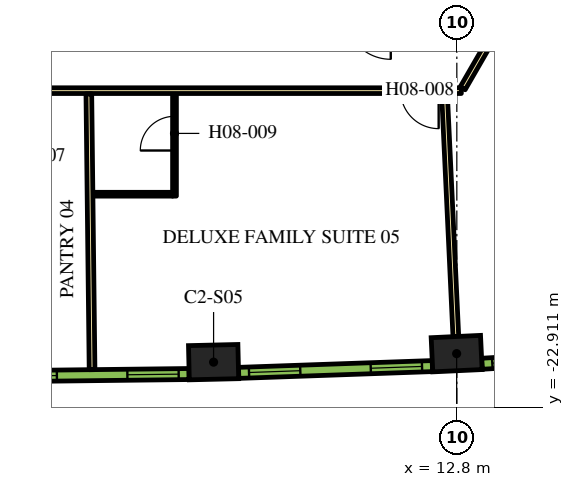
"""IFC4 building model, lengths in metres.
Left out: names, types, materials, properties, quantities, classifications, styles, units other than length and angle.
Written with IfcOpenShell. Run it as: python <this file> out.ifc"""

import sys

from ifc_helpers import new_model, si_unit, direction, frame, frame_2d, origin, origin_2d, place, context, subcontext, project, spatial, rectangle, extrude, element, fill, save


model = new_model("IFC4")
c1 = context("Model", 3, precision=1e-05, world=origin(), true_north=direction((0.0, 1.0)))
c2 = subcontext(c1, "Body", "Model", "MODEL_VIEW")
j1 = project(units=[si_unit("LENGTHUNIT", "METRE"), si_unit("PLANEANGLEUNIT", "RADIAN")], contexts=[c1])
p1 = place(None, origin())
s1 = spatial("IfcSite", under=j1, at=p1, CompositionType="ELEMENT")
p2 = place(p1, origin())
s2 = spatial("IfcBuilding", under=s1, at=p2, CompositionType="ELEMENT")
p3 = place(p2, frame((0.0, 0.0, 111.0)))
s3 = spatial("IfcBuildingStorey", under=s2, at=p3, CompositionType="ELEMENT", Elevation=111.0)
for number, where, z_axis, x_axis in (
    (1, (6.399, -21.719, 0.0), (0.0, 0.0, 1.0), (1.0, 0.023, 0.0)),
    (2, (12.795, -21.494, 0.0), (0.0, 0.0, 1.0), (0.999, 0.047, 0.0)),
):
    element("IfcColumn", number, at=place(p3, frame(where, z_axis=z_axis, x_axis=x_axis)), inside=s3, PredefinedType="COLUMN", context=c2, shape_type="SweptSolid", body=[
        extrude(rectangle(XDim=1.3, YDim=0.9, at=origin_2d()), origin(), (0.0, 0.0, 1.0), 3.9),
    ])
p4 = place(p3, frame((12.918, -14.575, 0.0), z_axis=(0.0, 0.0, 1.0), x_axis=(-1.0, 0.0, 0.0)))
e3 = element("IfcWall", 3, at=p4, inside=s3, PredefinedType="PARTITIONING", context=c2, shape_type="SweptSolid", body=[
    extrude(rectangle(XDim=25.766, YDim=0.15, at=frame_2d((12.883, 0.0))), origin(), (0.0, 0.0, 1.0), 2.75),
])
p5 = place(p4, frame((24.586, 0.0, 0.0)))
e4 = element("IfcOpeningElement", 4, at=p5, cuts=e3, PredefinedType="OPENING", context=c2, shape_type="SweptSolid", body=[
    extrude(rectangle(XDim=1.0, YDim=2.1, at=frame_2d((0.5, 1.05))), frame((0.0, 0.085, 0.0), z_axis=(0.0, -1.0, 0.0), x_axis=(1.0, 0.0, 0.0)), (0.0, 0.0, 1.0), 0.17),
])
p6 = place(p4, frame((13.144, 0.0, 0.0)))
e5 = element("IfcOpeningElement", 5, at=p6, cuts=e3, PredefinedType="OPENING", context=c2, shape_type="SweptSolid", body=[
    extrude(rectangle(XDim=1.0, YDim=2.1, at=frame_2d((0.5, 1.05))), frame((0.0, 0.085, 0.0), z_axis=(0.0, -1.0, 0.0), x_axis=(1.0, 0.0, 0.0)), (0.0, 0.0, 1.0), 0.17),
])
p7 = place(p4, frame((10.874, 0.0, 0.0)))
e6 = element("IfcOpeningElement", 6, at=p7, cuts=e3, PredefinedType="OPENING", context=c2, shape_type="SweptSolid", body=[
    extrude(rectangle(XDim=0.9, YDim=2.1, at=frame_2d((0.45, 1.05))), frame((0.0, 0.085, 0.0), z_axis=(0.0, -1.0, 0.0), x_axis=(1.0, 0.0, 0.0)), (0.0, 0.0, 1.0), 0.17),
])
p8 = place(p4, frame((0.596, 0.0, 0.0)))
e7 = element("IfcOpeningElement", 7, at=p8, cuts=e3, PredefinedType="OPENING", context=c2, shape_type="SweptSolid", body=[
    extrude(rectangle(XDim=1.0, YDim=2.1, at=frame_2d((0.5, 1.05))), frame((0.0, 0.085, 0.0), z_axis=(0.0, -1.0, 0.0), x_axis=(1.0, 0.0, 0.0)), (0.0, 0.0, 1.0), 0.17),
])
p9 = place(p3, frame((15.587, -9.952, 0.0), z_axis=(0.0, 0.0, 1.0), x_axis=(-0.500016618951, -0.866015808616, 0.0)))
e8 = element("IfcWall", 8, at=p9, inside=s3, PredefinedType="PARTITIONING", context=c2, shape_type="SweptSolid", body=[
    extrude(rectangle(XDim=5.268, YDim=0.15, at=frame_2d((2.634, 0.0))), origin(), (0.0, 0.0, 1.0), 2.75),
])
p10 = place(p3, frame((3.202, -21.916, 0.0), z_axis=(0.0, 0.0, 1.0), x_axis=(-0.011707696285, 0.999931462575, 0.0)))
e9 = element("IfcWall", 9, at=p10, inside=s3, PredefinedType="PARTITIONING", context=c2, shape_type="SweptSolid", body=[
    extrude(rectangle(XDim=7.257, YDim=0.15, at=frame_2d((3.628, 0.0))), origin(), (0.0, 0.0, 1.0), 2.75),
])
p11 = place(p3, frame((12.774, -21.045, 0.0), z_axis=(0.0, 0.0, 1.0), x_axis=(-0.046750341626, 0.998906605023, 0.0)))
e10 = element("IfcWall", 10, at=p11, inside=s3, PredefinedType="PARTITIONING", context=c2, shape_type="SweptSolid", body=[
    extrude(rectangle(XDim=6.392, YDim=0.15, at=frame_2d((3.196, 0.0))), origin(), (0.0, 0.0, 1.0), 2.75),
])
p12 = place(p3, frame((5.371, -17.35, 0.0), z_axis=(0.0, 0.0, 1.0), x_axis=(0.0, 1.0, 0.0)))
e11 = element("IfcWall", 11, at=p12, inside=s3, PredefinedType="PARTITIONING", context=c2, shape_type="SweptSolid", body=[
    extrude(rectangle(XDim=2.7, YDim=0.1, at=frame_2d((1.35, 0.0))), origin(), (0.0, 0.0, 1.0), 2.75),
])
p13 = place(p12, frame((1.2, 0.0, 0.0)))
e12 = element("IfcOpeningElement", 12, at=p13, cuts=e11, PredefinedType="OPENING", context=c2, shape_type="SweptSolid", body=[
    extrude(rectangle(XDim=0.9, YDim=2.1, at=frame_2d((0.45, 1.05))), frame((0.0, 0.06, 0.0), z_axis=(0.0, -1.0, 0.0), x_axis=(1.0, 0.0, 0.0)), (0.0, 0.0, 1.0), 0.12),
])
p14 = place(p3, frame((5.321, -17.3, 0.0), z_axis=(0.0, 0.0, 1.0), x_axis=(-1.0, 0.0, 0.0)))
e13 = element("IfcWall", 13, at=p14, inside=s3, PredefinedType="PARTITIONING", context=c2, shape_type="SweptSolid", body=[
    extrude(rectangle(XDim=2.09, YDim=0.1, at=frame_2d((1.045, 0.0))), origin(), (0.0, 0.0, 1.0), 2.75),
])
p15 = place(p3, frame((0.653, -22.091, 0.0), z_axis=(0.0, 0.0, 1.0), x_axis=(0.999931786565, 0.011679992145, 0.0)))
e14 = element("IfcWall", 14, at=p15, inside=s3, PredefinedType="SOLIDWALL", context=c2, shape_type="SweptSolid", body=[
    extrude(rectangle(XDim=5.1, YDim=0.29, at=frame_2d((2.55, 0.0))), origin(), (0.0, 0.0, 1.0), 3.65),
])
p16 = place(p15, frame((0.273, 0.0, 0.9)))
e15 = element("IfcOpeningElement", 15, at=p16, cuts=e14, PredefinedType="OPENING", context=c2, shape_type="SweptSolid", body=[
    extrude(rectangle(XDim=1.35, YDim=2.15, at=frame_2d((0.675, 1.075))), frame((0.0, 0.155, 0.0), z_axis=(0.0, -1.0, 0.0), x_axis=(1.0, 0.0, 0.0)), (0.0, 0.0, 1.0), 0.31),
])
p17 = place(p15, frame((3.478, 0.0, 0.9)))
e16 = element("IfcOpeningElement", 16, at=p17, cuts=e14, PredefinedType="OPENING", context=c2, shape_type="SweptSolid", body=[
    extrude(rectangle(XDim=1.35, YDim=2.15, at=frame_2d((0.675, 1.075))), frame((0.0, 0.155, 0.0), z_axis=(0.0, -1.0, 0.0), x_axis=(1.0, 0.0, 0.0)), (0.0, 0.0, 1.0), 0.31),
])
p18 = place(p3, frame((7.059, -22.001, 0.0), z_axis=(0.0, 0.0, 1.0), x_axis=(0.999385993957, 0.035037623812, 0.0)))
e17 = element("IfcWall", 17, at=p18, inside=s3, PredefinedType="SOLIDWALL", context=c2, shape_type="SweptSolid", body=[
    extrude(rectangle(XDim=5.101, YDim=0.29, at=frame_2d((2.55, 0.0))), origin(), (0.0, 0.0, 1.0), 3.65),
])
p19 = place(p18, frame((0.273, 0.0, 0.9)))
e18 = element("IfcOpeningElement", 18, at=p19, cuts=e17, PredefinedType="OPENING", context=c2, shape_type="SweptSolid", body=[
    extrude(rectangle(XDim=1.35, YDim=2.15, at=frame_2d((0.675, 1.075))), frame((0.0, 0.155, 0.0), z_axis=(0.0, -1.0, 0.0), x_axis=(1.0, 0.0, 0.0)), (0.0, 0.0, 1.0), 0.31),
])
p20 = place(p18, frame((3.478, 0.0, 0.9)))
e19 = element("IfcOpeningElement", 19, at=p20, cuts=e17, PredefinedType="OPENING", context=c2, shape_type="SweptSolid", body=[
    extrude(rectangle(XDim=1.35, YDim=2.15, at=frame_2d((0.675, 1.075))), frame((0.0, 0.155, 0.0), z_axis=(0.0, -1.0, 0.0), x_axis=(1.0, 0.0, 0.0)), (0.0, 0.0, 1.0), 0.31),
])
p21 = place(p3, frame((13.462, -21.761, 0.0), z_axis=(0.0, 0.0, 1.0), x_axis=(0.998290511436, 0.058447025388, 0.0)))
e20 = element("IfcWall", 20, at=p21, inside=s3, PredefinedType="SOLIDWALL", context=c2, shape_type="SweptSolid", body=[
    extrude(rectangle(XDim=5.1, YDim=0.29, at=frame_2d((2.55, 0.0))), origin(), (0.0, 0.0, 1.0), 3.65),
])
p22 = place(p21, frame((0.272, 0.0, 0.9)))
e21 = element("IfcOpeningElement", 21, at=p22, cuts=e20, PredefinedType="OPENING", context=c2, shape_type="SweptSolid", body=[
    extrude(rectangle(XDim=1.35, YDim=2.15, at=frame_2d((0.675, 1.075))), frame((0.0, 0.155, 0.0), z_axis=(0.0, -1.0, 0.0), x_axis=(1.0, 0.0, 0.0)), (0.0, 0.0, 1.0), 0.31),
])
p23 = place(p21, frame((3.478, 0.0, 0.9)))
e22 = element("IfcOpeningElement", 22, at=p23, cuts=e20, PredefinedType="OPENING", context=c2, shape_type="SweptSolid", body=[
    extrude(rectangle(XDim=1.35, YDim=2.15, at=frame_2d((0.675, 1.075))), frame((0.0, 0.155, 0.0), z_axis=(0.0, -1.0, 0.0), x_axis=(1.0, 0.0, 0.0)), (0.0, 0.0, 1.0), 0.31),
])
p24 = place(p8, origin())
e23 = element("IfcDoor", 23, at=p24, inside=s3, OperationType="SINGLE_SWING_LEFT", PredefinedType="DOOR", context=c2, shape_type="SweptSolid", body=[
    extrude(rectangle(XDim=1.0, YDim=2.1, at=frame_2d((0.5, 1.05))), frame((0.0, 0.025, 0.0), z_axis=(0.0, -1.0, 0.0), x_axis=(1.0, 0.0, 0.0)), (0.0, 0.0, 1.0), 0.05),
])
fill(e7, e23)
p25 = place(p13, origin())
e24 = element("IfcDoor", 24, at=p25, inside=s3, OperationType="SINGLE_SWING_LEFT", PredefinedType="DOOR", context=c2, shape_type="SweptSolid", body=[
    extrude(rectangle(XDim=0.9, YDim=2.1, at=frame_2d((0.45, 1.05))), frame((0.0, 0.025, 0.0), z_axis=(0.0, -1.0, 0.0), x_axis=(1.0, 0.0, 0.0)), (0.0, 0.0, 1.0), 0.05),
])
fill(e12, e24)
p26 = place(p16, origin())
e25 = element("IfcWindow", 25, at=p26, inside=s3, PartitioningType="DOUBLE_PANEL_VERTICAL", PredefinedType="WINDOW", context=c2, shape_type="SweptSolid", body=[
    extrude(rectangle(XDim=1.35, YDim=2.15, at=frame_2d((0.675, 1.075))), frame((0.0, 0.015, 0.0), z_axis=(0.0, -1.0, 0.0), x_axis=(1.0, 0.0, 0.0)), (0.0, 0.0, 1.0), 0.06),
])
fill(e15, e25)
p27 = place(p17, origin())
e26 = element("IfcWindow", 26, at=p27, inside=s3, PartitioningType="DOUBLE_PANEL_VERTICAL", PredefinedType="WINDOW", context=c2, shape_type="SweptSolid", body=[
    extrude(rectangle(XDim=1.35, YDim=2.15, at=frame_2d((0.675, 1.075))), frame((0.0, 0.015, 0.0), z_axis=(0.0, -1.0, 0.0), x_axis=(1.0, 0.0, 0.0)), (0.0, 0.0, 1.0), 0.06),
])
fill(e16, e26)
p28 = place(p19, origin())
e27 = element("IfcWindow", 27, at=p28, inside=s3, PartitioningType="DOUBLE_PANEL_VERTICAL", PredefinedType="WINDOW", context=c2, shape_type="SweptSolid", body=[
    extrude(rectangle(XDim=1.35, YDim=2.15, at=frame_2d((0.675, 1.075))), frame((0.0, 0.015, 0.0), z_axis=(0.0, -1.0, 0.0), x_axis=(1.0, 0.0, 0.0)), (0.0, 0.0, 1.0), 0.06),
])
fill(e18, e27)
p29 = place(p20, origin())
e28 = element("IfcWindow", 28, at=p29, inside=s3, PartitioningType="DOUBLE_PANEL_VERTICAL", PredefinedType="WINDOW", context=c2, shape_type="SweptSolid", body=[
    extrude(rectangle(XDim=1.35, YDim=2.15, at=frame_2d((0.675, 1.075))), frame((0.0, 0.015, 0.0), z_axis=(0.0, -1.0, 0.0), x_axis=(1.0, 0.0, 0.0)), (0.0, 0.0, 1.0), 0.06),
])
fill(e19, e28)
p30 = place(p22, origin())
e29 = element("IfcWindow", 29, at=p30, inside=s3, PartitioningType="DOUBLE_PANEL_VERTICAL", PredefinedType="WINDOW", context=c2, shape_type="SweptSolid", body=[
    extrude(rectangle(XDim=1.35, YDim=2.15, at=frame_2d((0.675, 1.075))), frame((0.0, 0.015, 0.0), z_axis=(0.0, -1.0, 0.0), x_axis=(1.0, 0.0, 0.0)), (0.0, 0.0, 1.0), 0.06),
])
fill(e21, e29)
save(model, sys.argv[1])
